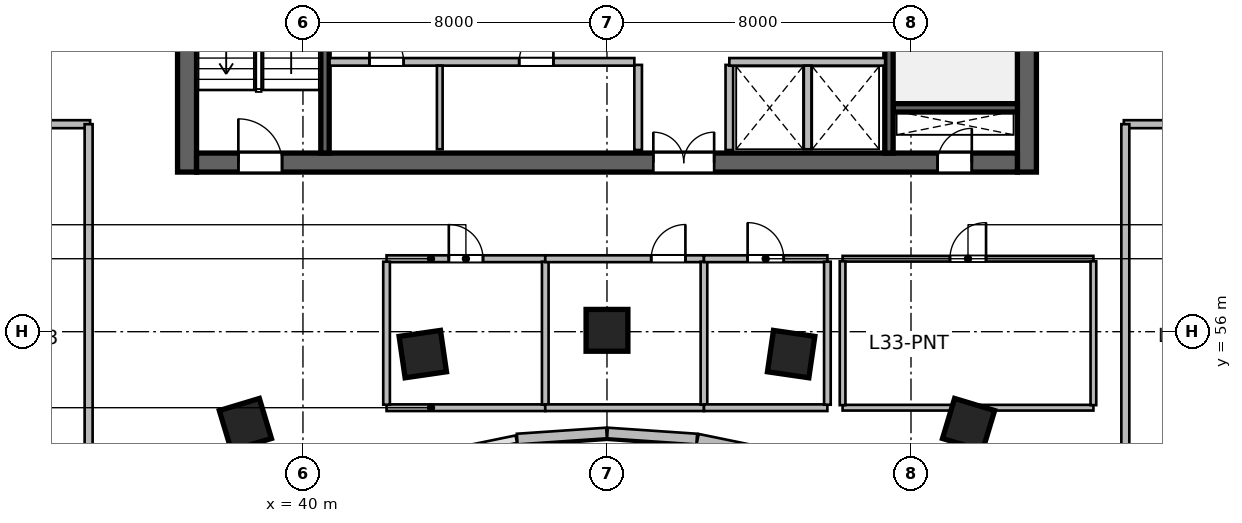
"""IFC4 building model, lengths in metres.
Left out: names, types, materials, properties, quantities, classifications, styles, units other than length and angle.
Written with IfcOpenShell. Run it as: python <this file> out.ifc"""

import sys

from ifc_helpers import new_model, si_unit, direction, frame, frame_2d, origin, origin_2d, place, context, subcontext, project, spatial, rectangle, extrude, source, transform, mapped, element, fill, save


model = new_model("IFC4")
c1 = context("Model", 3, precision=1e-05, world=origin(), true_north=direction((0.0, 1.0)))
c2 = subcontext(c1, "Body", "Model", "MODEL_VIEW")
j1 = project(units=[si_unit("LENGTHUNIT", "METRE"), si_unit("PLANEANGLEUNIT", "RADIAN")], contexts=[c1])
p1 = place(None, origin())
s1 = spatial("IfcSite", under=j1, at=p1, CompositionType="ELEMENT")
p2 = place(p1, origin())
s2 = spatial("IfcBuilding", under=s1, at=p2, CompositionType="ELEMENT")
p3 = place(p2, frame((0.0, 0.0, 138.9)))
s3 = spatial("IfcBuildingStorey", under=s2, at=p3, CompositionType="ELEMENT", Elevation=138.9)
m1 = source(origin(), c2, "Body", "SweptSolid", [
    extrude(rectangle(XDim=12.0, YDim=0.5, at=frame_2d((6.0, 0.0))), origin(), (0.0, 0.0, 1.0), 3.9),
])
for number, where, z_axis, x_axis in (
    (1, (36.95, 60.2, 0.0), (0.0, 0.0, 1.0), (0.0, 1.0, 0.0)),
    (2, (59.05, 60.2, 0.0), (0.0, 0.0, 1.0), (0.0, 1.0, 0.0)),
):
    element("IfcWall", number, at=place(p3, frame(where, z_axis=z_axis, x_axis=x_axis)), inside=s3, PredefinedType="SHEAR", context=c2, shape_type="MappedRepresentation", body=[
        mapped(m1, transform((0.0, 0.0, 0.0), scale=1.0)),
    ])
m2 = source(origin(), c2, "Body", "SweptSolid", [
    extrude(rectangle(XDim=21.6, YDim=0.5, at=frame_2d((10.8, 0.0))), origin(), (0.0, 0.0, 1.0), 3.9),
])
p4 = place(p3, frame((37.2, 60.45, 0.0), z_axis=(0.0, 0.0, 1.0), x_axis=(1.0, 0.0, 0.0)))
e3 = element("IfcWall", 3, at=p4, inside=s3, PredefinedType="SHEAR", context=c2, shape_type="MappedRepresentation", body=[
    mapped(m2, transform((0.0, 0.0, 0.0), scale=1.0)),
])
p5 = place(p4, frame((1.1, 0.0, 0.0)))
e4 = element("IfcOpeningElement", 4, at=p5, cuts=e3, PredefinedType="OPENING", context=c2, shape_type="SweptSolid", body=[
    extrude(rectangle(XDim=1.15, YDim=2.15, at=frame_2d((0.575, 1.075))), frame((0.0, 0.26, 0.0), z_axis=(0.0, -1.0, 0.0), x_axis=(1.0, 0.0, 0.0)), (0.0, 0.0, 1.0), 0.52),
])
p6 = place(p4, frame((19.5, 0.0, 0.0)))
e5 = element("IfcOpeningElement", 5, at=p6, cuts=e3, PredefinedType="OPENING", context=c2, shape_type="SweptSolid", body=[
    extrude(rectangle(XDim=0.9, YDim=2.1, at=frame_2d((0.45, 1.05))), frame((0.0, 0.26, 0.0), z_axis=(0.0, -1.0, 0.0), x_axis=(1.0, 0.0, 0.0)), (0.0, 0.0, 1.0), 0.52),
])
p7 = place(p4, frame((12.02, 0.0, 0.0)))
e6 = element("IfcOpeningElement", 6, at=p7, cuts=e3, PredefinedType="OPENING", context=c2, shape_type="SweptSolid", body=[
    extrude(rectangle(XDim=1.6, YDim=2.15, at=frame_2d((0.8, 1.075))), frame((0.0, 0.26, 0.0), z_axis=(0.0, -1.0, 0.0), x_axis=(1.0, 0.0, 0.0)), (0.0, 0.0, 1.0), 0.52),
])
m3 = source(origin(), c2, "Body", "SweptSolid", [
    extrude(rectangle(XDim=3.27, YDim=0.22, at=frame_2d((1.635, 0.0))), origin(), (0.0, 0.0, 1.0), 3.9),
])
p8 = place(p3, frame((55.53, 61.89, 0.0), z_axis=(0.0, 0.0, 1.0), x_axis=(1.0, 0.0, 0.0)))
e7 = element("IfcWall", 7, at=p8, inside=s3, PredefinedType="SHEAR", context=c2, shape_type="MappedRepresentation", body=[
    mapped(m3, transform((0.0, 0.0, 0.0), scale=1.0)),
])
m4 = source(origin(), c2, "Body", "SweptSolid", [
    extrude(rectangle(XDim=11.0, YDim=0.22, at=frame_2d((5.5, 0.0))), origin(), (0.0, 0.0, 1.0), 3.9),
])
p9 = place(p3, frame((40.58, 60.7, 0.0), z_axis=(0.0, 0.0, 1.0), x_axis=(0.0, 1.0, 0.0)))
e8 = element("IfcWall", 8, at=p9, inside=s3, PredefinedType="SHEAR", context=c2, shape_type="MappedRepresentation", body=[
    mapped(m4, transform((0.0, 0.0, 0.0), scale=1.0)),
])
p10 = place(p3, frame((55.42, 60.7, 0.0), z_axis=(0.0, 0.0, 1.0), x_axis=(0.0, 1.0, 0.0)))
e9 = element("IfcWall", 9, at=p10, inside=s3, PredefinedType="SHEAR", context=c2, shape_type="MappedRepresentation", body=[
    mapped(m4, transform((0.0, 0.0, 0.0), scale=1.0)),
])
p11 = place(p10, frame((9.545, 0.0, 0.0)))
e10 = element("IfcOpeningElement", 10, at=p11, cuts=e9, PredefinedType="OPENING", context=c2, shape_type="SweptSolid", body=[
    extrude(rectangle(XDim=1.15, YDim=2.15, at=frame_2d((0.575, 1.075))), frame((0.0, 0.12, 0.0), z_axis=(0.0, -1.0, 0.0), x_axis=(1.0, 0.0, 0.0)), (0.0, 0.0, 1.0), 0.24),
])
m5 = source(origin(), c2, "Body", "SweptSolid", [
    extrude(rectangle(XDim=1.1, YDim=1.1, at=origin_2d()), origin(), (0.0, 0.0, 1.0), 3.9),
])
for number, where, z_axis, x_axis in (
    (11, (38.485, 53.558, 0.0), (0.0, 0.0, 1.0), (-0.289, 0.957, 0.0)),
    (12, (43.154, 55.411, 0.0), (0.0, 0.0, 1.0), (-0.143, 0.99, 0.0)),
    (13, (48.0, 56.036, 0.0), (0.0, 0.0, 1.0), (0.0, 1.0, 0.0)),
    (14, (52.846, 55.411, 0.0), (0.0, 0.0, 1.0), (0.143, 0.99, 0.0)),
    (15, (57.515, 53.558, 0.0), (0.0, 0.0, 1.0), (0.289, 0.957, 0.0)),
):
    element("IfcColumn", number, at=place(p3, frame(where, z_axis=z_axis, x_axis=x_axis)), inside=s3, PredefinedType="COLUMN", context=c2, shape_type="MappedRepresentation", body=[
        mapped(m5, transform((0.0, 0.0, 0.0), scale=1.0)),
    ])
m6 = source(origin(), c2, "Body", "SweptSolid", [
    extrude(rectangle(XDim=2.374, YDim=0.28, at=frame_2d((1.187, 0.0))), origin(), (0.0, 0.0, 1.0), 3.65),
])
p12 = place(p3, frame((52.711, 52.695, 0.0), z_axis=(0.0, 0.0, 1.0), x_axis=(-0.979619827472, 0.200860632341, 0.0)))
e16 = element("IfcWall", 16, at=p12, inside=s3, PredefinedType="SOLIDWALL", context=c2, shape_type="MappedRepresentation", body=[
    mapped(m6, transform((0.0, 0.0, 0.0), scale=1.0)),
])
m7 = source(origin(), c2, "Body", "SweptSolid", [
    extrude(rectangle(XDim=2.355, YDim=0.28, at=frame_2d((1.177, 0.0))), origin(), (0.0, 0.0, 1.0), 3.65),
])
for number, where, z_axis, x_axis in (
    (17, (50.362, 53.175, 0.0), (0.0, 0.0, 1.0), (-0.998, 0.068, 0.0)),
    (18, (47.988, 53.335, 0.0), (0.0, 0.0, 1.0), (-0.998, -0.068, 0.0)),
):
    element("IfcWall", number, at=place(p3, frame(where, z_axis=z_axis, x_axis=x_axis)), inside=s3, PredefinedType="SOLIDWALL", context=c2, shape_type="MappedRepresentation", body=[
        mapped(m7, transform((0.0, 0.0, 0.0), scale=1.0)),
    ])
m8 = source(origin(), c2, "Body", "SweptSolid", [
    extrude(rectangle(XDim=2.24, YDim=0.2, at=frame_2d((1.12, 0.0))), origin(), (0.0, 0.0, 1.0), 3.65),
])
for number, where, z_axis, x_axis in (
    (19, (48.82, 60.78, 0.0), (0.0, 0.0, 1.0), (0.0, 1.0, 0.0)),
    (20, (51.22, 60.78, 0.0), (0.0, 0.0, 1.0), (0.0, 1.0, 0.0)),
):
    element("IfcWall", number, at=place(p3, frame(where, z_axis=z_axis, x_axis=x_axis)), inside=s3, PredefinedType="SOLIDWALL", context=c2, shape_type="MappedRepresentation", body=[
        mapped(m8, transform((0.0, 0.0, 0.0), scale=1.0)),
    ])
m9 = source(origin(), c2, "Body", "SweptSolid", [
    extrude(rectangle(XDim=8.02, YDim=0.2, at=frame_2d((4.01, 0.0))), origin(), (0.0, 0.0, 1.0), 3.65),
])
p13 = place(p3, frame((40.7, 63.1, 0.0), z_axis=(0.0, 0.0, 1.0), x_axis=(1.0, 0.0, 0.0)))
e21 = element("IfcWall", 21, at=p13, inside=s3, PredefinedType="SOLIDWALL", context=c2, shape_type="MappedRepresentation", body=[
    mapped(m9, transform((0.0, 0.0, 0.0), scale=1.0)),
])
p14 = place(p13, frame((1.05, 0.0, 0.0)))
e22 = element("IfcOpeningElement", 22, at=p14, cuts=e21, PredefinedType="OPENING", context=c2, shape_type="SweptSolid", body=[
    extrude(rectangle(XDim=0.9, YDim=2.1, at=frame_2d((0.45, 1.05))), frame((0.0, 0.11, 0.0), z_axis=(0.0, -1.0, 0.0), x_axis=(1.0, 0.0, 0.0)), (0.0, 0.0, 1.0), 0.22),
])
p15 = place(p13, frame((4.99, 0.0, 0.0)))
e23 = element("IfcOpeningElement", 23, at=p15, cuts=e21, PredefinedType="OPENING", context=c2, shape_type="SweptSolid", body=[
    extrude(rectangle(XDim=0.9, YDim=2.1, at=frame_2d((0.45, 1.05))), frame((0.0, 0.11, 0.0), z_axis=(0.0, -1.0, 0.0), x_axis=(1.0, 0.0, 0.0)), (0.0, 0.0, 1.0), 0.22),
])
m10 = source(origin(), c2, "Body", "SweptSolid", [
    extrude(rectangle(XDim=4.1, YDim=0.2, at=frame_2d((2.05, 0.0))), origin(), (0.0, 0.0, 1.0), 3.65),
])
p16 = place(p3, frame((51.22, 63.1, 0.0), z_axis=(0.0, 0.0, 1.0), x_axis=(1.0, 0.0, 0.0)))
e24 = element("IfcWall", 24, at=p16, inside=s3, PredefinedType="SOLIDWALL", context=c2, shape_type="MappedRepresentation", body=[
    mapped(m10, transform((0.0, 0.0, 0.0), scale=1.0)),
])
m11 = source(origin(), c2, "Body", "SweptSolid", [
    extrude(rectangle(XDim=2.2, YDim=0.15, at=frame_2d((1.1, 0.0))), origin(), (0.0, 0.0, 1.0), 3.65),
])
p17 = place(p3, frame((43.6, 60.8, 0.0), z_axis=(0.0, 0.0, 1.0), x_axis=(0.0, 1.0, 0.0)))
e25 = element("IfcWall", 25, at=p17, inside=s3, PredefinedType="PARTITIONING", context=c2, shape_type="MappedRepresentation", body=[
    mapped(m11, transform((0.0, 0.0, 0.0), scale=1.0)),
])
m12 = source(origin(), c2, "Body", "SweptSolid", [
    extrude(rectangle(XDim=2.2, YDim=0.2, at=frame_2d((1.1, 0.0))), origin(), (0.0, 0.0, 1.0), 3.65),
])
p18 = place(p3, frame((53.28, 60.8, 0.0), z_axis=(0.0, 0.0, 1.0), x_axis=(0.0, 1.0, 0.0)))
e26 = element("IfcWall", 26, at=p18, inside=s3, PredefinedType="SOLIDWALL", context=c2, shape_type="MappedRepresentation", body=[
    mapped(m12, transform((0.0, 0.0, 0.0), scale=1.0)),
])
m13 = source(origin(), c2, "Body", "SweptSolid", [
    extrude(rectangle(XDim=4.176, YDim=0.175, at=frame_2d((2.088, 0.0))), origin(), (0.0, 0.0, 1.0), 3.65),
])
p19 = place(p3, frame((42.2, 54.0, 0.0), z_axis=(0.0, 0.0, 1.0), x_axis=(1.0, 0.0, 0.0)))
e27 = element("IfcWall", 27, at=p19, inside=s3, PredefinedType="PARTITIONING", context=c2, shape_type="MappedRepresentation", body=[
    mapped(m13, transform((0.0, 0.0, 0.0), scale=1.0)),
])
m14 = source(origin(), c2, "Body", "SweptSolid", [
    extrude(rectangle(XDim=4.176, YDim=0.18, at=frame_2d((2.088, 0.0))), origin(), (0.0, 0.0, 1.0), 3.65),
])
p20 = place(p3, frame((42.2, 57.92, 0.0), z_axis=(0.0, 0.0, 1.0), x_axis=(1.0, 0.0, 0.0)))
e28 = element("IfcWall", 28, at=p20, inside=s3, PredefinedType="PLUMBINGWALL", context=c2, shape_type="MappedRepresentation", body=[
    mapped(m14, transform((0.0, 0.0, 0.0), scale=1.0)),
])
p21 = place(p20, frame((1.638, 0.0, 0.0)))
e29 = element("IfcOpeningElement", 29, at=p21, cuts=e28, PredefinedType="OPENING", context=c2, shape_type="SweptSolid", body=[
    extrude(rectangle(XDim=0.9, YDim=2.08, at=frame_2d((0.45, 1.04))), frame((0.0, 0.1, 0.0), z_axis=(0.0, -1.0, 0.0), x_axis=(1.0, 0.0, 0.0)), (0.0, 0.0, 1.0), 0.2),
])
m15 = source(origin(), c2, "Body", "SweptSolid", [
    extrude(rectangle(XDim=3.763, YDim=0.175, at=frame_2d((1.881, 0.0))), origin(), (0.0, 0.0, 1.0), 3.65),
])
for number, where, z_axis, x_axis in (
    (30, (42.2, 54.079, 0.0), (0.0, 0.0, 1.0), (0.0, 1.0, 0.0)),
    (31, (46.376, 54.079, 0.0), (0.0, 0.0, 1.0), (0.0, 1.0, 0.0)),
):
    element("IfcWall", number, at=place(p3, frame(where, z_axis=z_axis, x_axis=x_axis)), inside=s3, PredefinedType="PARTITIONING", context=c2, shape_type="MappedRepresentation", body=[
        mapped(m15, transform((0.0, 0.0, 0.0), scale=1.0)),
    ])
p22 = place(p3, frame((46.376, 54.0, 0.0), z_axis=(0.0, 0.0, 1.0), x_axis=(1.0, 0.0, 0.0)))
e32 = element("IfcWall", 32, at=p22, inside=s3, PredefinedType="PARTITIONING", context=c2, shape_type="MappedRepresentation", body=[
    mapped(m13, transform((0.0, 0.0, 0.0), scale=1.0)),
])
p23 = place(p3, frame((46.376, 57.92, 0.0), z_axis=(0.0, 0.0, 1.0), x_axis=(1.0, 0.0, 0.0)))
e33 = element("IfcWall", 33, at=p23, inside=s3, PredefinedType="PLUMBINGWALL", context=c2, shape_type="MappedRepresentation", body=[
    mapped(m14, transform((0.0, 0.0, 0.0), scale=1.0)),
])
p24 = place(p23, frame((2.788, 0.0, 0.0)))
e34 = element("IfcOpeningElement", 34, at=p24, cuts=e33, PredefinedType="OPENING", context=c2, shape_type="SweptSolid", body=[
    extrude(rectangle(XDim=0.9, YDim=2.08, at=frame_2d((0.45, 1.04))), frame((0.0, 0.1, 0.0), z_axis=(0.0, -1.0, 0.0), x_axis=(1.0, 0.0, 0.0)), (0.0, 0.0, 1.0), 0.2),
])
p25 = place(p3, frame((50.552, 54.079, 0.0), z_axis=(0.0, 0.0, 1.0), x_axis=(0.0, 1.0, 0.0)))
e35 = element("IfcWall", 35, at=p25, inside=s3, PredefinedType="PARTITIONING", context=c2, shape_type="MappedRepresentation", body=[
    mapped(m15, transform((0.0, 0.0, 0.0), scale=1.0)),
])
m16 = source(origin(), c2, "Body", "SweptSolid", [
    extrude(rectangle(XDim=3.248, YDim=0.175, at=frame_2d((1.624, 0.0))), origin(), (0.0, 0.0, 1.0), 3.65),
])
p26 = place(p3, frame((50.552, 54.0, 0.0), z_axis=(0.0, 0.0, 1.0), x_axis=(1.0, 0.0, 0.0)))
e36 = element("IfcWall", 36, at=p26, inside=s3, PredefinedType="PARTITIONING", context=c2, shape_type="MappedRepresentation", body=[
    mapped(m16, transform((0.0, 0.0, 0.0), scale=1.0)),
])
m17 = source(origin(), c2, "Body", "SweptSolid", [
    extrude(rectangle(XDim=3.248, YDim=0.18, at=frame_2d((1.624, 0.0))), origin(), (0.0, 0.0, 1.0), 3.65),
])
p27 = place(p3, frame((50.552, 57.92, 0.0), z_axis=(0.0, 0.0, 1.0), x_axis=(1.0, 0.0, 0.0)))
e37 = element("IfcWall", 37, at=p27, inside=s3, PredefinedType="PLUMBINGWALL", context=c2, shape_type="MappedRepresentation", body=[
    mapped(m17, transform((0.0, 0.0, 0.0), scale=1.0)),
])
p28 = place(p27, frame((1.149, 0.0, 0.0)))
e38 = element("IfcOpeningElement", 38, at=p28, cuts=e37, PredefinedType="OPENING", context=c2, shape_type="SweptSolid", body=[
    extrude(rectangle(XDim=0.95, YDim=2.12, at=frame_2d((0.475, 1.06))), frame((0.0, 0.1, 0.0), z_axis=(0.0, -1.0, 0.0), x_axis=(1.0, 0.0, 0.0)), (0.0, 0.0, 1.0), 0.2),
])
p29 = place(p3, frame((53.8, 54.079, 0.0), z_axis=(0.0, 0.0, 1.0), x_axis=(0.0, 1.0, 0.0)))
e39 = element("IfcWall", 39, at=p29, inside=s3, PredefinedType="PARTITIONING", context=c2, shape_type="MappedRepresentation", body=[
    mapped(m15, transform((0.0, 0.0, 0.0), scale=1.0)),
])
m18 = source(origin(), c2, "Body", "SweptSolid", [
    extrude(rectangle(XDim=6.6, YDim=0.15, at=frame_2d((3.3, 0.0))), origin(), (0.0, 0.0, 1.0), 3.095),
])
p30 = place(p3, frame((54.2, 54.0, 0.0), z_axis=(0.0, 0.0, 1.0), x_axis=(1.0, 0.0, 0.0)))
e40 = element("IfcWall", 40, at=p30, inside=s3, PredefinedType="PARTITIONING", context=c2, shape_type="MappedRepresentation", body=[
    mapped(m18, transform((0.0, 0.0, 0.0), scale=1.0)),
])
m19 = source(origin(), c2, "Body", "SweptSolid", [
    extrude(rectangle(XDim=6.6, YDim=0.15, at=frame_2d((3.3, 0.0))), origin(), (0.0, 0.0, 1.0), 3.65),
])
p31 = place(p3, frame((54.2, 57.92, 0.0), z_axis=(0.0, 0.0, 1.0), x_axis=(1.0, 0.0, 0.0)))
e41 = element("IfcWall", 41, at=p31, inside=s3, PredefinedType="PARTITIONING", context=c2, shape_type="MappedRepresentation", body=[
    mapped(m19, transform((0.0, 0.0, 0.0), scale=1.0)),
])
p32 = place(p31, frame((2.825, 0.0, 0.0)))
e42 = element("IfcOpeningElement", 42, at=p32, cuts=e41, PredefinedType="OPENING", context=c2, shape_type="SweptSolid", body=[
    extrude(rectangle(XDim=0.95, YDim=2.1, at=frame_2d((0.475, 1.05))), frame((0.0, 0.085, 0.0), z_axis=(0.0, -1.0, 0.0), x_axis=(1.0, 0.0, 0.0)), (0.0, 0.0, 1.0), 0.17),
])
m20 = source(origin(), c2, "Body", "SweptSolid", [
    extrude(rectangle(XDim=3.785, YDim=0.15, at=frame_2d((1.893, 0.0))), origin(), (0.0, 0.0, 1.0), 3.65),
])
for number, where, z_axis, x_axis in (
    (43, (54.2, 54.067, 0.0), (0.0, 0.0, 1.0), (0.0, 1.0, 0.0)),
    (44, (60.8, 54.067, 0.0), (0.0, 0.0, 1.0), (0.0, 1.0, 0.0)),
):
    element("IfcWall", number, at=place(p3, frame(where, z_axis=z_axis, x_axis=x_axis)), inside=s3, PredefinedType="PARTITIONING", context=c2, shape_type="MappedRepresentation", body=[
        mapped(m20, transform((0.0, 0.0, 0.0), scale=1.0)),
    ])
m21 = source(origin(), c2, "Body", "SweptSolid", [
    extrude(rectangle(XDim=4.2, YDim=0.21, at=frame_2d((2.1, 0.0))), origin(), (0.0, 0.0, 1.0), 3.65),
])
p33 = place(p3, frame((30.2, 61.46, 0.0), z_axis=(0.0, 0.0, 1.0), x_axis=(1.0, 0.0, 0.0)))
e45 = element("IfcWall", 45, at=p33, inside=s3, PredefinedType="PARTITIONING", context=c2, shape_type="MappedRepresentation", body=[
    mapped(m21, transform((0.0, 0.0, 0.0), scale=1.0)),
])
p34 = place(p33, frame((1.625, 0.0, 0.0)))
e46 = element("IfcOpeningElement", 46, at=p34, cuts=e45, PredefinedType="OPENING", context=c2, shape_type="SweptSolid", body=[
    extrude(rectangle(XDim=0.95, YDim=2.1, at=frame_2d((0.475, 1.05))), frame((0.0, 0.115, 0.0), z_axis=(0.0, -1.0, 0.0), x_axis=(1.0, 0.0, 0.0)), (0.0, 0.0, 1.0), 0.23),
])
m22 = source(origin(), c2, "Body", "SweptSolid", [
    extrude(rectangle(XDim=13.988, YDim=0.21, at=frame_2d((6.994, 0.0))), origin(), (0.0, 0.0, 1.0), 3.65),
])
p35 = place(p3, frame((34.36, 47.472, 0.0), z_axis=(0.0, 0.0, 1.0), x_axis=(0.0, 1.0, 0.0)))
e47 = element("IfcWall", 47, at=p35, inside=s3, PredefinedType="PARTITIONING", context=c2, shape_type="MappedRepresentation", body=[
    mapped(m22, transform((0.0, 0.0, 0.0), scale=1.0)),
])
p36 = place(p3, frame((61.6, 61.46, 0.0), z_axis=(0.0, 0.0, 1.0), x_axis=(1.0, 0.0, 0.0)))
e48 = element("IfcWall", 48, at=p36, inside=s3, PredefinedType="PARTITIONING", context=c2, shape_type="MappedRepresentation", body=[
    mapped(m21, transform((0.0, 0.0, 0.0), scale=1.0)),
])
p37 = place(p36, frame((1.625, 0.0, 0.0)))
e49 = element("IfcOpeningElement", 49, at=p37, cuts=e48, PredefinedType="OPENING", context=c2, shape_type="SweptSolid", body=[
    extrude(rectangle(XDim=0.95, YDim=2.1, at=frame_2d((0.475, 1.05))), frame((0.0, 0.115, 0.0), z_axis=(0.0, -1.0, 0.0), x_axis=(1.0, 0.0, 0.0)), (0.0, 0.0, 1.0), 0.23),
])
m23 = source(origin(), c2, "Body", "SweptSolid", [
    extrude(rectangle(XDim=13.988, YDim=0.21, at=frame_2d((6.994, 0.0))), origin(), (0.0, 0.0, 1.0), 2.942),
])
p38 = place(p3, frame((61.64, 47.472, 0.0), z_axis=(0.0, 0.0, 1.0), x_axis=(0.0, 1.0, 0.0)))
e50 = element("IfcWall", 50, at=p38, inside=s3, PredefinedType="PARTITIONING", context=c2, shape_type="MappedRepresentation", body=[
    mapped(m23, transform((0.0, 0.0, 0.0), scale=1.0)),
])
m24 = source(origin(), c2, "Body", "SweptSolid", [
    extrude(rectangle(XDim=1.15, YDim=2.15, at=frame_2d((0.575, 1.075))), frame((0.0, 0.025, 0.0), z_axis=(0.0, -1.0, 0.0), x_axis=(1.0, 0.0, 0.0)), (0.0, 0.0, 1.0), 0.05),
])
p39 = place(p5, origin())
e51 = element("IfcDoor", 51, at=p39, inside=s3, OperationType="SINGLE_SWING_LEFT", PredefinedType="DOOR", context=c2, shape_type="MappedRepresentation", body=[
    mapped(m24, transform((0.0, 0.0, 0.0), scale=1.0)),
])
fill(e4, e51)
m25 = source(origin(), c2, "Body", "SweptSolid", [
    extrude(rectangle(XDim=0.9, YDim=2.1, at=frame_2d((0.45, 1.05))), frame((0.0, 0.025, 0.0), z_axis=(0.0, -1.0, 0.0), x_axis=(1.0, 0.0, 0.0)), (0.0, 0.0, 1.0), 0.05),
])
p40 = place(p6, origin())
e52 = element("IfcDoor", 52, at=p40, inside=s3, OperationType="SINGLE_SWING_RIGHT", PredefinedType="DOOR", context=c2, shape_type="MappedRepresentation", body=[
    mapped(m25, transform((0.0, 0.0, 0.0), scale=1.0)),
])
fill(e5, e52)
m26 = source(origin(), c2, "Body", "SweptSolid", [
    extrude(rectangle(XDim=1.6, YDim=2.15, at=frame_2d((0.8, 1.075))), frame((0.0, 0.025, 0.0), z_axis=(0.0, -1.0, 0.0), x_axis=(1.0, 0.0, 0.0)), (0.0, 0.0, 1.0), 0.05),
])
p41 = place(p7, origin())
e53 = element("IfcDoor", 53, at=p41, inside=s3, OperationType="DOUBLE_DOOR_SINGLE_SWING", PredefinedType="DOOR", context=c2, shape_type="MappedRepresentation", body=[
    mapped(m26, transform((0.0, 0.0, 0.0), scale=1.0)),
])
fill(e6, e53)
p42 = place(p14, origin())
e54 = element("IfcDoor", 54, at=p42, inside=s3, OperationType="SINGLE_SWING_LEFT", PredefinedType="DOOR", context=c2, shape_type="MappedRepresentation", body=[
    mapped(m25, transform((0.0, 0.0, 0.0), scale=1.0)),
])
fill(e22, e54)
p43 = place(p15, origin())
e55 = element("IfcDoor", 55, at=p43, inside=s3, OperationType="SINGLE_SWING_RIGHT", PredefinedType="DOOR", context=c2, shape_type="MappedRepresentation", body=[
    mapped(m25, transform((0.0, 0.0, 0.0), scale=1.0)),
])
fill(e23, e55)
m27 = source(origin(), c2, "Body", "SweptSolid", [
    extrude(rectangle(XDim=0.9, YDim=2.08, at=frame_2d((0.45, 1.04))), frame((0.0, 0.025, 0.0), z_axis=(0.0, -1.0, 0.0), x_axis=(1.0, 0.0, 0.0)), (0.0, 0.0, 1.0), 0.05),
])
p44 = place(p21, origin())
e56 = element("IfcDoor", 56, at=p44, inside=s3, OperationType="SINGLE_SWING_LEFT", PredefinedType="DOOR", context=c2, shape_type="MappedRepresentation", body=[
    mapped(m27, transform((0.0, 0.0, 0.0), scale=1.0)),
])
fill(e29, e56)
p45 = place(p24, origin())
e57 = element("IfcDoor", 57, at=p45, inside=s3, OperationType="SINGLE_SWING_RIGHT", PredefinedType="DOOR", context=c2, shape_type="MappedRepresentation", body=[
    mapped(m27, transform((0.0, 0.0, 0.0), scale=1.0)),
])
fill(e34, e57)
m28 = source(origin(), c2, "Body", "SweptSolid", [
    extrude(rectangle(XDim=0.95, YDim=2.12, at=frame_2d((0.475, 1.06))), frame((0.0, 0.025, 0.0), z_axis=(0.0, -1.0, 0.0), x_axis=(1.0, 0.0, 0.0)), (0.0, 0.0, 1.0), 0.05),
])
p46 = place(p28, origin())
e58 = element("IfcDoor", 58, at=p46, inside=s3, OperationType="SINGLE_SWING_LEFT", PredefinedType="DOOR", context=c2, shape_type="MappedRepresentation", body=[
    mapped(m28, transform((0.0, 0.0, 0.0), scale=1.0)),
])
fill(e38, e58)
m29 = source(origin(), c2, "Body", "SweptSolid", [
    extrude(rectangle(XDim=0.95, YDim=2.1, at=frame_2d((0.475, 1.05))), frame((0.0, 0.025, 0.0), z_axis=(0.0, -1.0, 0.0), x_axis=(1.0, 0.0, 0.0)), (0.0, 0.0, 1.0), 0.05),
])
p47 = place(p32, origin())
e59 = element("IfcDoor", 59, at=p47, inside=s3, OperationType="SINGLE_SWING_RIGHT", PredefinedType="DOOR", context=c2, shape_type="MappedRepresentation", body=[
    mapped(m29, transform((0.0, 0.0, 0.0), scale=1.0)),
])
fill(e42, e59)
save(model, sys.argv[1])
